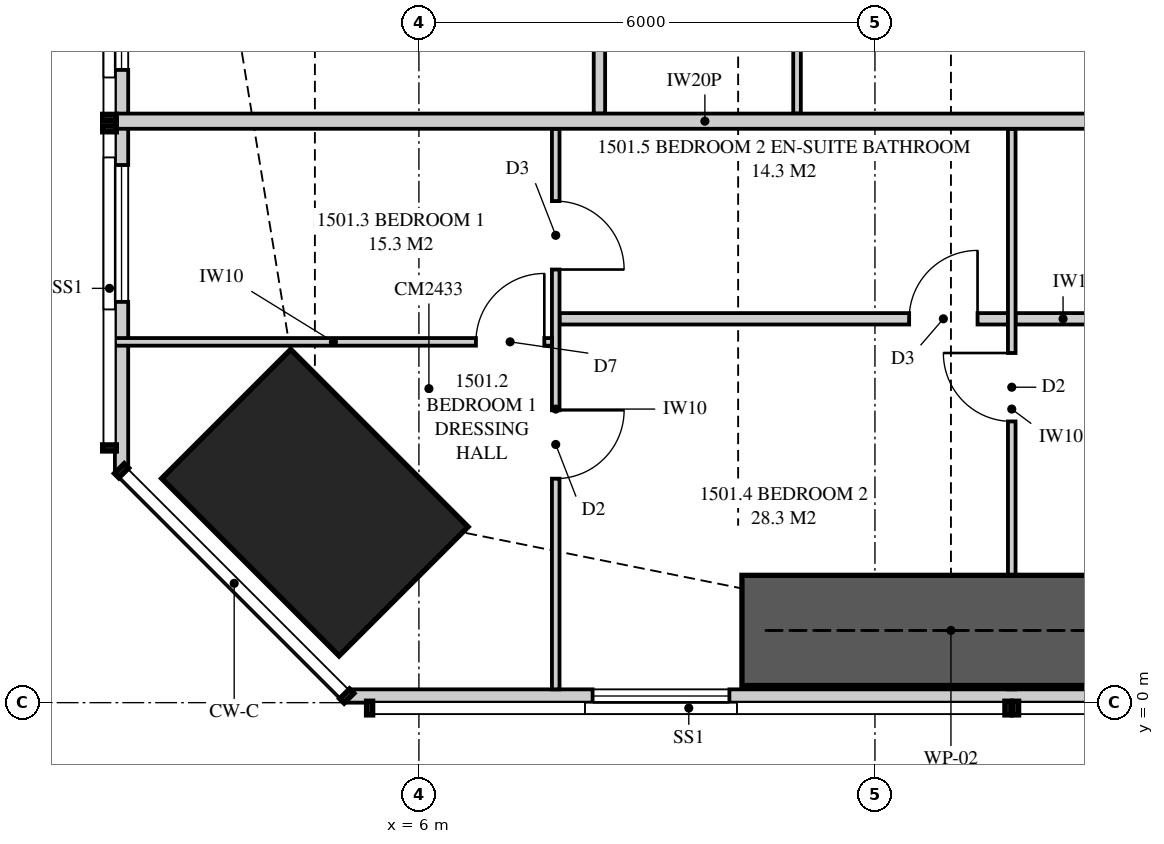
"""IFC4 building model, lengths in metres.
Left out: names, types, materials, properties, quantities, classifications, styles, units other than length and angle.
Written with IfcOpenShell. Run it as: python <this file> out.ifc"""

import sys

from ifc_helpers import new_model, si_unit, direction, frame, frame_2d, origin, origin_2d, place, context, subcontext, project, spatial, polyline, rectangle, outline, extrude, element, fill, save


model = new_model("IFC4")
c1 = context("Model", 3, precision=1e-05, world=origin(), true_north=direction((0.0, 1.0)))
c2 = subcontext(c1, "Body", "Model", "MODEL_VIEW")
j1 = project(units=[si_unit("LENGTHUNIT", "METRE"), si_unit("PLANEANGLEUNIT", "RADIAN")], contexts=[c1])
p1 = place(None, origin())
s1 = spatial("IfcSite", under=j1, at=p1, CompositionType="ELEMENT")
p2 = place(p1, origin())
s2 = spatial("IfcBuilding", under=s1, at=p2, CompositionType="ELEMENT")
p3 = place(p2, frame((0.0, 0.0, 57.85)))
s3 = spatial("IfcBuildingStorey", under=s2, at=p3, CompositionType="ELEMENT", Elevation=57.85)
p4 = place(p3, frame((4.631, 2.631, 0.0), z_axis=(0.0, 0.0, 1.0), x_axis=(0.707106781187, 0.707106781187, 0.0)))
e1 = element("IfcColumn", 1, at=p4, inside=s3, PredefinedType="COLUMN", context=c2, shape_type="SweptSolid", body=[
    extrude(rectangle(XDim=2.4, YDim=3.3, at=origin_2d()), origin(), (0.0, 0.0, 1.0), 3.35),
])
p5 = place(p3, frame((5.051, 0.087, 0.0), z_axis=(0.0, 0.0, 1.0), x_axis=(1.0, 0.0, 0.0)))
e2 = element("IfcWall", 2, at=p5, inside=s3, PredefinedType="SOLIDWALL", context=c2, shape_type="SweptSolid", body=[
    extrude(outline(polyline([(0.0, 0.0), (21.749, 0.0), (21.749, 2.15), (7.949, 2.15), (7.949, 3.11), (7.793, 3.11), (7.793, 2.15), (7.745, 2.15), (7.745, 3.11), (0.0, 3.11), (0.0, 0.0)])), frame((0.0, 0.087, 0.0), z_axis=(0.0, -1.0, 0.0), x_axis=(1.0, 0.0, 0.0)), (0.0, 0.0, 1.0), 0.175),
])
p6 = place(p5, frame((3.234, 0.0, 0.4)))
e3 = element("IfcOpeningElement", 3, at=p6, cuts=e2, PredefinedType="OPENING", context=c2, shape_type="SweptSolid", body=[
    extrude(rectangle(XDim=1.8, YDim=1.7, at=frame_2d((0.9, 0.85))), frame((0.0, 0.097, 0.0), z_axis=(0.0, -1.0, 0.0), x_axis=(1.0, 0.0, 0.0)), (0.0, 0.0, 1.0), 0.195),
])
p7 = place(p5, frame((10.806, 0.0, 0.4)))
e4 = element("IfcOpeningElement", 4, at=p7, cuts=e2, PredefinedType="OPENING", context=c2, shape_type="SweptSolid", body=[
    extrude(rectangle(XDim=1.8, YDim=1.7, at=frame_2d((0.9, 0.85))), frame((0.0, 0.097, 0.0), z_axis=(0.0, -1.0, 0.0), x_axis=(1.0, 0.0, 0.0)), (0.0, 0.0, 1.0), 0.195),
])
p8 = place(p5, frame((13.674, 0.0, 0.4)))
e5 = element("IfcOpeningElement", 5, at=p8, cuts=e2, PredefinedType="OPENING", context=c2, shape_type="SweptSolid", body=[
    extrude(rectangle(XDim=1.8, YDim=1.7, at=frame_2d((0.9, 0.85))), frame((0.0, 0.097, 0.0), z_axis=(0.0, -1.0, 0.0), x_axis=(1.0, 0.0, 0.0)), (0.0, 0.0, 1.0), 0.195),
])
p9 = place(p3, frame((2.087, 16.3, 0.0), z_axis=(0.0, 0.0, 1.0), x_axis=(0.0, -1.0, 0.0)))
e6 = element("IfcWall", 6, at=p9, inside=s3, PredefinedType="SOLIDWALL", context=c2, shape_type="SweptSolid", body=[
    extrude(outline(polyline([(0.0, 0.0), (13.249, 0.0), (13.249, 3.11), (3.519, 3.11), (3.519, 2.15), (3.426, 2.15), (3.426, 3.11), (3.3, 3.11), (3.3, 2.15), (0.0, 2.15), (0.0, 0.0)])), frame((0.0, 0.087, 0.0), z_axis=(0.0, -1.0, 0.0), x_axis=(1.0, 0.0, 0.0)), (0.0, 0.0, 1.0), 0.175),
])
p10 = place(p9, frame((6.175, 0.0, 0.4)))
e7 = element("IfcOpeningElement", 7, at=p10, cuts=e6, PredefinedType="OPENING", context=c2, shape_type="SweptSolid", body=[
    extrude(rectangle(XDim=1.8, YDim=1.7, at=frame_2d((0.9, 0.85))), frame((0.0, 0.097, 0.0), z_axis=(0.0, -1.0, 0.0), x_axis=(1.0, 0.0, 0.0)), (0.0, 0.0, 1.0), 0.195),
])
p11 = place(p9, frame((9.227, 0.0, 0.4)))
e8 = element("IfcOpeningElement", 8, at=p11, cuts=e6, PredefinedType="OPENING", context=c2, shape_type="SweptSolid", body=[
    extrude(rectangle(XDim=1.8, YDim=1.7, at=frame_2d((0.9, 0.85))), frame((0.0, 0.097, 0.0), z_axis=(0.0, -1.0, 0.0), x_axis=(1.0, 0.0, 0.0)), (0.0, 0.0, 1.0), 0.195),
])
p12 = place(p3, frame((7.8, 0.175, 0.0), z_axis=(0.0, 0.0, 1.0), x_axis=(0.0, 1.0, 0.0)))
e9 = element("IfcWall", 9, at=p12, inside=s3, PredefinedType="PARTITIONING", context=c2, shape_type="SweptSolid", body=[
    extrude(outline(polyline([(0.0, 0.0), (7.375, 0.0), (7.375, 3.11), (2.697, 3.11), (2.697, 2.15), (0.943, 2.15), (0.943, 3.11), (0.0, 3.11), (0.0, 0.0)])), frame((0.0, 0.05, 0.0), z_axis=(0.0, -1.0, 0.0), x_axis=(1.0, 0.0, 0.0)), (0.0, 0.0, 1.0), 0.1),
])
p13 = place(p12, frame((2.772, 0.0, 0.0)))
e10 = element("IfcOpeningElement", 10, at=p13, cuts=e9, PredefinedType="OPENING", context=c2, shape_type="SweptSolid", body=[
    extrude(rectangle(XDim=0.9, YDim=2.1, at=frame_2d((0.45, 1.05))), frame((0.0, 0.06, 0.0), z_axis=(0.0, -1.0, 0.0), x_axis=(1.0, 0.0, 0.0)), (0.0, 0.0, 1.0), 0.12),
])
p14 = place(p12, frame((5.523, 0.0, 0.0)))
e11 = element("IfcOpeningElement", 11, at=p14, cuts=e9, PredefinedType="OPENING", context=c2, shape_type="SweptSolid", body=[
    extrude(rectangle(XDim=0.9, YDim=2.1, at=frame_2d((0.45, 1.05))), frame((0.0, 0.06, 0.0), z_axis=(0.0, -1.0, 0.0), x_axis=(1.0, 0.0, 0.0)), (0.0, 0.0, 1.0), 0.12),
])
p15 = place(p3, frame((13.8, 0.175, 0.0), z_axis=(0.0, 0.0, 1.0), x_axis=(0.0, 1.0, 0.0)))
e12 = element("IfcWall", 12, at=p15, inside=s3, PredefinedType="PARTITIONING", context=c2, shape_type="SweptSolid", body=[
    extrude(outline(polyline([(1.635, 2.15), (0.0, 2.15), (0.0, 0.0), (7.375, 0.0), (7.375, 3.11), (1.635, 3.11), (1.635, 2.15)]), holes=[polyline([(1.021, 0.133), (0.529, 0.133), (0.529, 0.923), (1.021, 0.923), (1.021, 0.133)]), polyline([(1.021, 1.227), (0.529, 1.227), (0.529, 2.017), (1.021, 2.017), (1.021, 1.227)])]), frame((0.0, 0.05, 0.0), z_axis=(0.0, -1.0, 0.0), x_axis=(1.0, 0.0, 0.0)), (0.0, 0.0, 1.0), 0.1),
])
p16 = place(p15, frame((3.525, 0.0, 0.0)))
e13 = element("IfcOpeningElement", 13, at=p16, cuts=e12, PredefinedType="OPENING", context=c2, shape_type="SweptSolid", body=[
    extrude(rectangle(XDim=0.9, YDim=2.1, at=frame_2d((0.45, 1.05))), frame((0.0, 0.06, 0.0), z_axis=(0.0, -1.0, 0.0), x_axis=(1.0, 0.0, 0.0)), (0.0, 0.0, 1.0), 0.12),
])
p17 = place(p3, frame((2.0, 4.747, 0.0), z_axis=(0.0, 0.0, 1.0), x_axis=(1.0, 0.0, 0.0)))
e14 = element("IfcWall", 14, at=p17, inside=s3, PredefinedType="PARTITIONING", context=c2, shape_type="SweptSolid", body=[
    extrude(outline(polyline([(0.0, 0.0), (5.75, 0.0), (5.75, 3.11), (3.16, 3.11), (3.16, 2.15), (1.417, 2.15), (1.417, 3.11), (0.0, 3.11), (0.0, 0.0)])), frame((0.0, 0.05, 0.0), z_axis=(0.0, -1.0, 0.0), x_axis=(1.0, 0.0, 0.0)), (0.0, 0.0, 1.0), 0.1),
])
p18 = place(p17, frame((4.75, 0.0, 0.0)))
e15 = element("IfcOpeningElement", 15, at=p18, cuts=e14, PredefinedType="OPENING", context=c2, shape_type="SweptSolid", body=[
    extrude(rectangle(XDim=0.9, YDim=2.1, at=frame_2d((0.45, 1.05))), frame((0.0, 0.06, 0.0), z_axis=(0.0, -1.0, 0.0), x_axis=(1.0, 0.0, 0.0)), (0.0, 0.0, 1.0), 0.12),
])
p19 = place(p3, frame((7.85, 5.05, 0.0), z_axis=(0.0, 0.0, 1.0), x_axis=(1.0, 0.0, 0.0)))
e16 = element("IfcWall", 16, at=p19, inside=s3, PredefinedType="PLUMBINGWALL", context=c2, shape_type="SweptSolid", body=[
    extrude(outline(polyline([(0.0, 0.0), (5.9, 0.0), (5.9, 3.11), (5.462, 3.11), (5.462, 2.541), (4.838, 2.541), (4.838, 3.11), (3.635, 3.11), (3.635, 2.51), (1.065, 2.51), (1.065, 3.11), (0.0, 3.11), (0.0, 0.0)])), frame((0.0, 0.075, 0.0), z_axis=(0.0, -1.0, 0.0), x_axis=(1.0, 0.0, 0.0)), (0.0, 0.0, 1.0), 0.15),
])
p20 = place(p19, frame((4.6, 0.0, 0.0)))
e17 = element("IfcOpeningElement", 17, at=p20, cuts=e16, PredefinedType="OPENING", context=c2, shape_type="SweptSolid", body=[
    extrude(rectangle(XDim=0.9, YDim=2.1, at=frame_2d((0.45, 1.05))), frame((0.0, 0.085, 0.0), z_axis=(0.0, -1.0, 0.0), x_axis=(1.0, 0.0, 0.0)), (0.0, 0.0, 1.0), 0.17),
])
p21 = place(p3, frame((13.85, 5.05, 0.0), z_axis=(0.0, 0.0, 1.0), x_axis=(1.0, 0.0, 0.0)))
e18 = element("IfcWall", 18, at=p21, inside=s3, PredefinedType="PLUMBINGWALL", context=c2, shape_type="SweptSolid", body=[
    extrude(rectangle(XDim=4.2, YDim=0.15, at=frame_2d((2.1, 0.0))), origin(), (0.0, 0.0, 1.0), 3.11),
])
p22 = place(p21, frame((2.9, 0.0, 0.0)))
e19 = element("IfcOpeningElement", 19, at=p22, cuts=e18, PredefinedType="OPENING", context=c2, shape_type="SweptSolid", body=[
    extrude(rectangle(XDim=0.9, YDim=2.1, at=frame_2d((0.45, 1.05))), frame((0.0, 0.085, 0.0), z_axis=(0.0, -1.0, 0.0), x_axis=(1.0, 0.0, 0.0)), (0.0, 0.0, 1.0), 0.17),
])
p23 = place(p3, frame((2.0, 7.65, 0.0), z_axis=(0.0, 0.0, 1.0), x_axis=(1.0, 0.0, 0.0)))
e20 = element("IfcWall", 20, at=p23, inside=s3, PredefinedType="PARTITIONING", context=c2, shape_type="SweptSolid", body=[
    extrude(outline(polyline([(0.0, 0.0), (15.525, 0.0), (15.525, 3.11), (11.337, 3.11), (11.337, 2.541), (10.663, 2.541), (10.663, 3.11), (9.51, 3.11), (9.51, 2.51), (6.89, 2.51), (6.89, 3.11), (2.969, 3.11), (2.969, 2.541), (2.74, 2.541), (2.74, 2.15), (0.896, 2.15), (0.896, 3.11), (0.0, 3.11), (0.0, 0.0)])), frame((0.0, 0.1, 0.0), z_axis=(0.0, -1.0, 0.0), x_axis=(1.0, 0.0, 0.0)), (0.0, 0.0, 1.0), 0.2),
])
p24 = place(p3, frame((8.375, 7.75, 0.0), z_axis=(0.0, 0.0, 1.0), x_axis=(0.0, 1.0, 0.0)))
e21 = element("IfcWall", 21, at=p24, inside=s3, PredefinedType="PLUMBINGWALL", context=c2, shape_type="SweptSolid", body=[
    extrude(rectangle(XDim=3.45, YDim=0.15, at=frame_2d((1.725, 0.0))), origin(), (0.0, 0.0, 1.0), 3.11),
])
p25 = place(p3, frame((10.975, 7.75, 0.0), z_axis=(0.0, 0.0, 1.0), x_axis=(0.0, 1.0, 0.0)))
e22 = element("IfcWall", 22, at=p25, inside=s3, PredefinedType="PARTITIONING", context=c2, shape_type="SweptSolid", body=[
    extrude(outline(polyline([(0.0, 0.0), (3.45, 0.0), (3.45, 3.11), (3.45, 2.51), (0.0, 2.51), (0.0, 3.11), (0.0, 0.0)])), frame((0.0, 0.05, 0.0), z_axis=(0.0, -1.0, 0.0), x_axis=(1.0, 0.0, 0.0)), (0.0, 0.0, 1.0), 0.1),
])
p26 = place(p3, frame((10.25, 0.95, 0.0), z_axis=(0.0, 0.0, 1.0), x_axis=(1.0, 0.0, 0.0)))
e23 = element("IfcWall", 23, at=p26, inside=s3, PredefinedType="SHEAR", context=c2, shape_type="SweptSolid", body=[
    extrude(rectangle(XDim=5.5, YDim=1.45, at=frame_2d((2.75, 0.0))), origin(), (0.0, 0.0, 1.0), 3.35),
])
p27 = place(p6, origin())
e24 = element("IfcWindow", 24, at=p27, inside=s3, PartitioningType="SINGLE_PANEL", PredefinedType="WINDOW", context=c2, shape_type="SweptSolid", body=[
    extrude(rectangle(XDim=1.8, YDim=1.7, at=frame_2d((0.9, 0.85))), frame((0.0, 0.03, 0.0), z_axis=(0.0, -1.0, 0.0), x_axis=(1.0, 0.0, 0.0)), (0.0, 0.0, 1.0), 0.06),
])
fill(e3, e24)
p28 = place(p10, origin())
e25 = element("IfcWindow", 25, at=p28, inside=s3, PartitioningType="SINGLE_PANEL", PredefinedType="WINDOW", context=c2, shape_type="SweptSolid", body=[
    extrude(rectangle(XDim=1.8, YDim=1.7, at=frame_2d((0.9, 0.85))), frame((0.0, 0.03, 0.0), z_axis=(0.0, -1.0, 0.0), x_axis=(1.0, 0.0, 0.0)), (0.0, 0.0, 1.0), 0.06),
])
fill(e7, e25)
p29 = place(p11, origin())
e26 = element("IfcWindow", 26, at=p29, inside=s3, PartitioningType="SINGLE_PANEL", PredefinedType="WINDOW", context=c2, shape_type="SweptSolid", body=[
    extrude(rectangle(XDim=1.8, YDim=1.7, at=frame_2d((0.9, 0.85))), frame((0.0, 0.03, 0.0), z_axis=(0.0, -1.0, 0.0), x_axis=(1.0, 0.0, 0.0)), (0.0, 0.0, 1.0), 0.06),
])
fill(e8, e26)
p30 = place(p18, origin())
e27 = element("IfcDoor", 27, at=p30, inside=s3, OperationType="SINGLE_SWING_RIGHT", PredefinedType="DOOR", context=c2, shape_type="SweptSolid", body=[
    extrude(rectangle(XDim=0.9, YDim=2.1, at=frame_2d((0.45, 1.05))), frame((0.0, 0.025, 0.0), z_axis=(0.0, -1.0, 0.0), x_axis=(1.0, 0.0, 0.0)), (0.0, 0.0, 1.0), 0.05),
])
fill(e15, e27)
p31 = place(p13, frame((0.9, 0.0, 0.0), z_axis=(0.0, 0.0, 1.0), x_axis=(-1.0, 0.0, 0.0)))
e28 = element("IfcDoor", 28, at=p31, inside=s3, OperationType="SINGLE_SWING_LEFT", PredefinedType="DOOR", context=c2, shape_type="SweptSolid", body=[
    extrude(rectangle(XDim=0.9, YDim=2.1, at=frame_2d((0.45, 1.05))), frame((0.0, 0.025, 0.0), z_axis=(0.0, -1.0, 0.0), x_axis=(1.0, 0.0, 0.0)), (0.0, 0.0, 1.0), 0.05),
])
fill(e10, e28)
p32 = place(p16, origin())
e29 = element("IfcDoor", 29, at=p32, inside=s3, OperationType="SINGLE_SWING_RIGHT", PredefinedType="DOOR", context=c2, shape_type="SweptSolid", body=[
    extrude(rectangle(XDim=0.9, YDim=2.1, at=frame_2d((0.45, 1.05))), frame((0.0, 0.025, 0.0), z_axis=(0.0, -1.0, 0.0), x_axis=(1.0, 0.0, 0.0)), (0.0, 0.0, 1.0), 0.05),
])
fill(e13, e29)
p33 = place(p20, origin())
e30 = element("IfcDoor", 30, at=p33, inside=s3, OperationType="SINGLE_SWING_RIGHT", PredefinedType="DOOR", context=c2, shape_type="SweptSolid", body=[
    extrude(rectangle(XDim=0.9, YDim=2.1, at=frame_2d((0.45, 1.05))), frame((0.0, 0.025, 0.0), z_axis=(0.0, -1.0, 0.0), x_axis=(1.0, 0.0, 0.0)), (0.0, 0.0, 1.0), 0.05),
])
fill(e17, e30)
p34 = place(p14, frame((0.9, 0.0, 0.0), z_axis=(0.0, 0.0, 1.0), x_axis=(-1.0, 0.0, 0.0)))
e31 = element("IfcDoor", 31, at=p34, inside=s3, OperationType="SINGLE_SWING_RIGHT", PredefinedType="DOOR", context=c2, shape_type="SweptSolid", body=[
    extrude(rectangle(XDim=0.9, YDim=2.1, at=frame_2d((0.45, 1.05))), frame((0.0, 0.025, 0.0), z_axis=(0.0, -1.0, 0.0), x_axis=(1.0, 0.0, 0.0)), (0.0, 0.0, 1.0), 0.05),
])
fill(e11, e31)
save(model, sys.argv[1])
